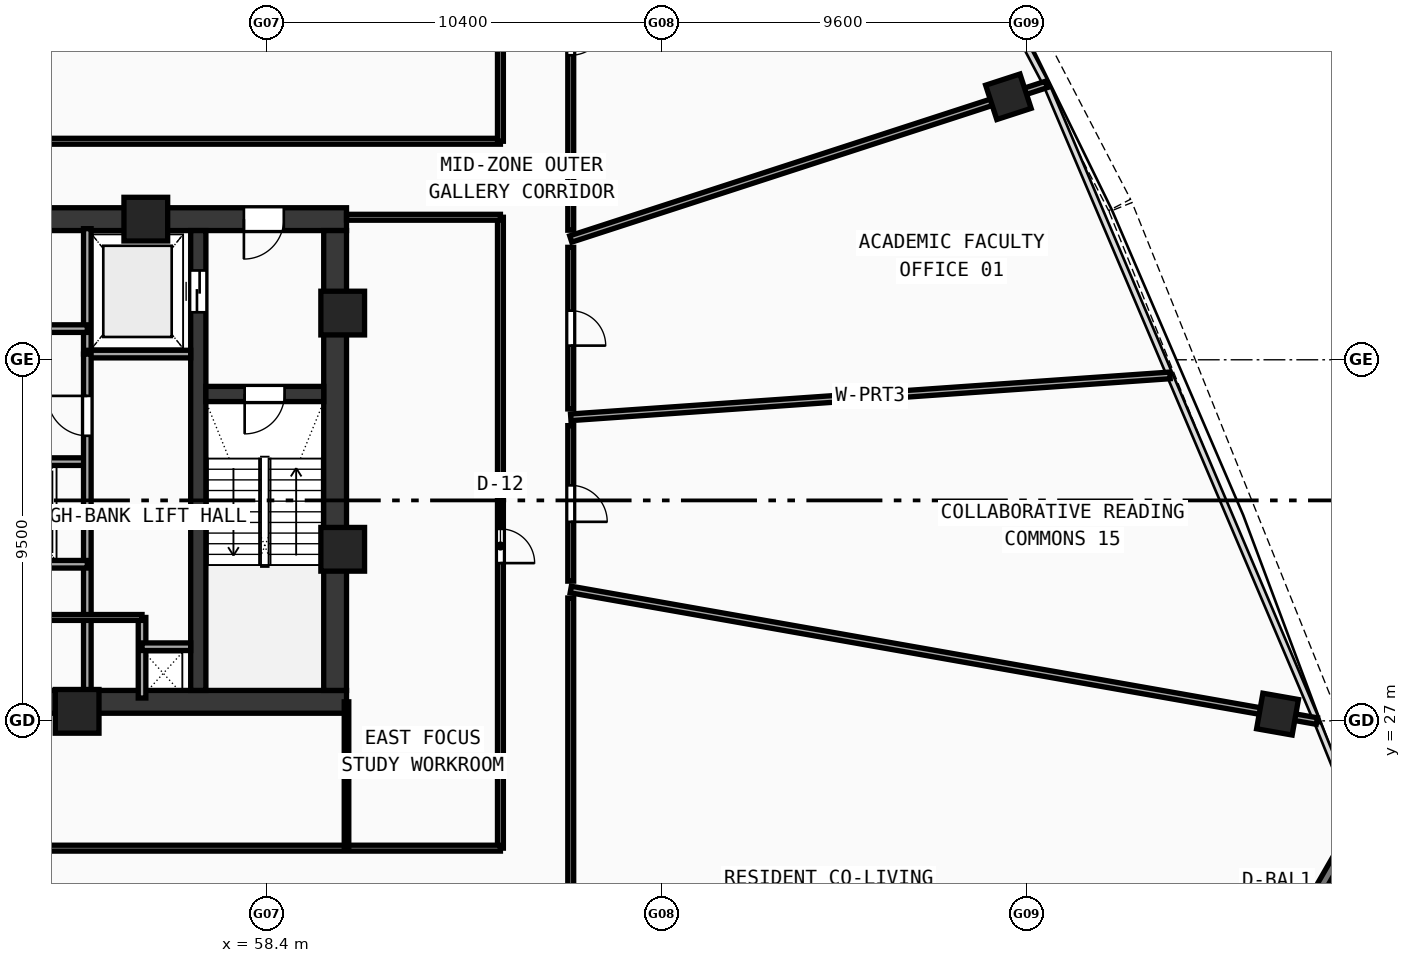
"""IFC4 building model, lengths in metres.
Left out: names, types, materials, properties, quantities, classifications, styles, units other than length and angle.
Written with IfcOpenShell. Run it as: python <this file> out.ifc"""

import sys

from ifc_helpers import new_model, si_unit, direction, frame, frame_2d, origin, origin_with_axes, origin_2d, place, context, subcontext, project, spatial, rectangle, hollow_rectangle, extrude, source, transform, mapped, element, fill, save


model = new_model("IFC4")
c1 = context("Model", 3, precision=1e-05, world=origin(), true_north=direction((0.0, 1.0)))
c2 = subcontext(c1, "Body", "Model", "MODEL_VIEW")
j1 = project(units=[si_unit("LENGTHUNIT", "METRE"), si_unit("PLANEANGLEUNIT", "RADIAN")], contexts=[c1])
p1 = place(None, origin())
s1 = spatial("IfcSite", under=j1, at=p1, CompositionType="ELEMENT")
p2 = place(p1, origin())
s2 = spatial("IfcBuilding", under=s1, at=p2, CompositionType="ELEMENT")
p3 = place(p2, frame((0.0, 0.0, 162.95)))
s3 = spatial("IfcBuildingStorey", under=s2, at=p3, CompositionType="ELEMENT", Elevation=162.95)
p4 = place(p3, frame((35.5, 27.5, 0.0), z_axis=(0.0, 0.0, 1.0), x_axis=(1.0, 0.0, 0.0)))
e1 = element("IfcWall", 1, at=p4, inside=s3, PredefinedType="SHEAR", context=c2, shape_type="SweptSolid", body=[
    extrude(rectangle(XDim=25.0, YDim=0.6, at=frame_2d((12.5, 0.0))), origin(), (0.0, 0.0, 1.0), 3.42),
])
p5 = place(p3, frame((49.2, 40.2, 0.0), z_axis=(0.0, 0.0, 1.0), x_axis=(1.0, 0.0, 0.0)))
e2 = element("IfcWall", 2, at=p5, inside=s3, PredefinedType="SHEAR", context=c2, shape_type="SweptSolid", body=[
    extrude(rectangle(XDim=11.3, YDim=0.6, at=frame_2d((5.65, 0.0))), origin(), (0.0, 0.0, 1.0), 3.42),
])
p6 = place(p5, frame((8.6, 0.0, 0.0)))
e3 = element("IfcOpeningElement", 3, at=p6, cuts=e2, PredefinedType="OPENING", context=c2, shape_type="SweptSolid", body=[
    extrude(rectangle(XDim=1.05, YDim=2.1, at=frame_2d((0.525, 1.05))), frame((0.0, 0.31, 0.0), z_axis=(0.0, -1.0, 0.0), x_axis=(1.0, 0.0, 0.0)), (0.0, 0.0, 1.0), 0.62),
])
p7 = place(p3, frame((60.2, 27.8, 0.0), z_axis=(0.0, 0.0, 1.0), x_axis=(0.0, 1.0, 0.0)))
e4 = element("IfcWall", 4, at=p7, inside=s3, PredefinedType="SHEAR", context=c2, shape_type="SweptSolid", body=[
    extrude(rectangle(XDim=12.1, YDim=0.6, at=frame_2d((6.05, 0.0))), origin(), (0.0, 0.0, 1.0), 3.42),
])
p8 = place(p3, frame((56.6, 27.8, 0.0), z_axis=(0.0, 0.0, 1.0), x_axis=(0.0, 1.0, 0.0)))
e5 = element("IfcWall", 5, at=p8, inside=s3, PredefinedType="SHEAR", context=c2, shape_type="SweptSolid", body=[
    extrude(rectangle(XDim=12.1, YDim=0.4, at=frame_2d((6.05, 0.0))), origin(), (0.0, 0.0, 1.0), 3.42),
])
p9 = place(p8, frame((9.95, 0.0, 0.0)))
e6 = element("IfcOpeningElement", 6, at=p9, cuts=e5, PredefinedType="OPENING", context=c2, shape_type="SweptSolid", body=[
    extrude(rectangle(XDim=1.1, YDim=2.1, at=frame_2d((0.55, 1.05))), frame((0.0, 0.21, 0.0), z_axis=(0.0, -1.0, 0.0), x_axis=(1.0, 0.0, 0.0)), (0.0, 0.0, 1.0), 0.42),
])
p10 = place(p3, frame((56.8, 35.6, 0.0), z_axis=(0.0, 0.0, 1.0), x_axis=(1.0, 0.0, 0.0)))
e7 = element("IfcWall", 7, at=p10, inside=s3, PredefinedType="SHEAR", context=c2, shape_type="SweptSolid", body=[
    extrude(rectangle(XDim=3.1, YDim=0.4, at=frame_2d((1.55, 0.0))), origin(), (0.0, 0.0, 1.0), 3.42),
])
p11 = place(p10, frame((1.02, 0.0, 0.0)))
e8 = element("IfcOpeningElement", 8, at=p11, cuts=e7, PredefinedType="OPENING", context=c2, shape_type="SweptSolid", body=[
    extrude(rectangle(XDim=1.05, YDim=2.1, at=frame_2d((0.525, 1.05))), frame((0.0, 0.21, 0.0), z_axis=(0.0, -1.0, 0.0), x_axis=(1.0, 0.0, 0.0)), (0.0, 0.0, 1.0), 0.42),
])
m1 = source(origin(), c2, "Body", "SweptSolid", [
    extrude(hollow_rectangle(XDim=1.15, YDim=1.15, WallThickness=0.048, at=origin_2d()), origin(), (0.0, 0.0, 1.0), 3.68),
])
for number, where, z_axis, x_axis in (
    (9, (53.412, 27.25, -0.26), (0.0, 0.0, 1.0), (1.0, 0.0, 0.0)),
    (10, (60.4, 31.513, -0.26), (0.0, 0.0, 1.0), (1.0, 0.0, 0.0)),
    (11, (60.4, 37.729, -0.26), (0.0, 0.0, 1.0), (1.0, 0.0, 0.0)),
    (12, (55.219, 40.2, -0.26), (0.0, 0.0, 1.0), (1.0, 0.0, 0.0)),
):
    element("IfcColumn", number, at=place(p3, frame(where, z_axis=z_axis, x_axis=x_axis)), inside=s3, PredefinedType="COLUMN", context=c2, shape_type="MappedRepresentation", body=[
        mapped(m1, transform((0.0, 0.0, 0.0), scale=1.0)),
    ])
m2 = source(origin(), c2, "Body", "SweptSolid", [
    extrude(hollow_rectangle(XDim=0.95, YDim=0.95, WallThickness=0.04, at=origin_2d()), origin(), (0.0, 0.0, 1.0), 3.68),
])
for number, where, z_axis, x_axis in (
    (13, (84.997, 27.177, -0.26), (0.0, 0.0, 1.0), (0.174, 0.985, 0.0)),
    (14, (77.915, 43.42, -0.26), (0.0, 0.0, 1.0), (-0.309, 0.951, 0.0)),
):
    element("IfcColumn", number, at=place(p3, frame(where, z_axis=z_axis, x_axis=x_axis)), inside=s3, PredefinedType="COLUMN", context=c2, shape_type="MappedRepresentation", body=[
        mapped(m2, transform((0.0, 0.0, 0.0), scale=1.0)),
    ])
p12 = place(p3, frame((82.814, 16.821, 0.0), z_axis=(0.0, 0.0, 1.0), x_axis=(0.497939858886, 0.867211564114, 0.0)))
e15 = element("IfcWall", 15, at=p12, inside=s3, PredefinedType="STANDARD", context=c2, shape_type="SweptSolid", body=[
    extrude(rectangle(XDim=8.696, YDim=0.26, at=frame_2d((4.348, 0.0))), origin(), (0.0, 0.0, 1.0), 3.42),
])
p13 = place(p12, frame((3.448, 0.0, 0.0)))
e16 = element("IfcOpeningElement", 16, at=p13, cuts=e15, PredefinedType="OPENING", context=c2, shape_type="SweptSolid", body=[
    extrude(rectangle(XDim=1.8, YDim=2.15, at=frame_2d((0.9, 1.075))), frame((0.0, 0.14, 0.0), z_axis=(0.0, -1.0, 0.0), x_axis=(1.0, 0.0, 0.0)), (0.0, 0.0, 1.0), 0.28),
])
p14 = place(p3, frame((53.68, 36.65, 0.0), z_axis=(0.0, 0.0, 1.0), x_axis=(0.0, 1.0, 0.0)))
e17 = element("IfcWall", 17, at=p14, inside=s3, PredefinedType="SOLIDWALL", context=c2, shape_type="SweptSolid", body=[
    extrude(rectangle(XDim=3.3, YDim=0.2, at=frame_2d((1.65, 0.0))), origin(), (0.0, 0.0, 1.0), 3.42),
])
p15 = place(p3, frame((53.68, 36.65, 0.0), z_axis=(0.0, 0.0, 1.0), x_axis=(1.0, 0.0, 0.0)))
e18 = element("IfcWall", 18, at=p15, inside=s3, PredefinedType="SOLIDWALL", context=c2, shape_type="SweptSolid", body=[
    extrude(rectangle(XDim=2.72, YDim=0.2, at=frame_2d((1.36, 0.0))), origin(), (0.0, 0.0, 1.0), 3.42),
])
p16 = place(p3, frame((48.95, 37.32, 0.0), z_axis=(0.0, 0.0, 1.0), x_axis=(1.0, 0.0, 0.0)))
e19 = element("IfcWall", 19, at=p16, inside=s3, PredefinedType="SOLIDWALL", context=c2, shape_type="SweptSolid", body=[
    extrude(rectangle(XDim=4.73, YDim=0.2, at=frame_2d((2.365, 0.0))), origin(), (0.0, 0.0, 1.0), 3.42),
])
p17 = place(p16, frame((1.8, 0.0, 0.0)))
e20 = element("IfcOpeningElement", 20, at=p17, cuts=e19, PredefinedType="OPENING", context=c2, shape_type="SweptSolid", body=[
    extrude(rectangle(XDim=0.9, YDim=2.1, at=frame_2d((0.45, 1.05))), frame((0.0, 0.11, 0.0), z_axis=(0.0, -1.0, 0.0), x_axis=(1.0, 0.0, 0.0)), (0.0, 0.0, 1.0), 0.22),
])
p18 = place(p3, frame((43.85, 33.82, 0.0), z_axis=(0.0, 0.0, 1.0), x_axis=(1.0, 0.0, 0.0)))
e21 = element("IfcWall", 21, at=p18, inside=s3, PredefinedType="SOLIDWALL", context=c2, shape_type="SweptSolid", body=[
    extrude(rectangle(XDim=9.83, YDim=0.2, at=frame_2d((4.915, 0.0))), origin(), (0.0, 0.0, 1.0), 3.42),
])
p19 = place(p18, frame((0.575, 0.0, 0.0)))
e22 = element("IfcOpeningElement", 22, at=p19, cuts=e21, PredefinedType="OPENING", context=c2, shape_type="SweptSolid", body=[
    extrude(rectangle(XDim=1.05, YDim=2.1, at=frame_2d((0.525, 1.05))), frame((0.0, 0.11, 0.0), z_axis=(0.0, -1.0, 0.0), x_axis=(1.0, 0.0, 0.0)), (0.0, 0.0, 1.0), 0.22),
])
p20 = place(p18, frame((2.875, 0.0, 0.0)))
e23 = element("IfcOpeningElement", 23, at=p20, cuts=e21, PredefinedType="OPENING", context=c2, shape_type="SweptSolid", body=[
    extrude(rectangle(XDim=1.05, YDim=2.1, at=frame_2d((0.525, 1.05))), frame((0.0, 0.11, 0.0), z_axis=(0.0, -1.0, 0.0), x_axis=(1.0, 0.0, 0.0)), (0.0, 0.0, 1.0), 0.22),
])
p21 = place(p18, frame((5.175, 0.0, 0.0)))
e24 = element("IfcOpeningElement", 24, at=p21, cuts=e21, PredefinedType="OPENING", context=c2, shape_type="SweptSolid", body=[
    extrude(rectangle(XDim=1.05, YDim=2.1, at=frame_2d((0.525, 1.05))), frame((0.0, 0.11, 0.0), z_axis=(0.0, -1.0, 0.0), x_axis=(1.0, 0.0, 0.0)), (0.0, 0.0, 1.0), 0.22),
])
p22 = place(p18, frame((7.475, 0.0, 0.0)))
e25 = element("IfcOpeningElement", 25, at=p22, cuts=e21, PredefinedType="OPENING", context=c2, shape_type="SweptSolid", body=[
    extrude(rectangle(XDim=1.05, YDim=2.1, at=frame_2d((0.525, 1.05))), frame((0.0, 0.11, 0.0), z_axis=(0.0, -1.0, 0.0), x_axis=(1.0, 0.0, 0.0)), (0.0, 0.0, 1.0), 0.22),
])
p23 = place(p3, frame((53.68, 27.6, 0.0), z_axis=(0.0, 0.0, 1.0), x_axis=(0.0, 1.0, 0.0)))
e26 = element("IfcWall", 26, at=p23, inside=s3, PredefinedType="SOLIDWALL", context=c2, shape_type="SweptSolid", body=[
    extrude(rectangle(XDim=9.05, YDim=0.2, at=frame_2d((4.525, 0.0))), origin(), (0.0, 0.0, 1.0), 3.42),
])
p24 = place(p23, frame((6.9, 0.0, 0.0)))
e27 = element("IfcOpeningElement", 27, at=p24, cuts=e26, PredefinedType="OPENING", context=c2, shape_type="SweptSolid", body=[
    extrude(rectangle(XDim=1.05, YDim=2.1, at=frame_2d((0.525, 1.05))), frame((0.0, 0.11, 0.0), z_axis=(0.0, -1.0, 0.0), x_axis=(1.0, 0.0, 0.0)), (0.0, 0.0, 1.0), 0.22),
])
p25 = place(p3, frame((43.85, 31.12, 0.0), z_axis=(0.0, 0.0, 1.0), x_axis=(1.0, 0.0, 0.0)))
e28 = element("IfcWall", 28, at=p25, inside=s3, PredefinedType="SOLIDWALL", context=c2, shape_type="SweptSolid", body=[
    extrude(rectangle(XDim=9.83, YDim=0.2, at=frame_2d((4.915, 0.0))), origin(), (0.0, 0.0, 1.0), 3.42),
])
p26 = place(p3, frame((55.12, 27.6, 0.0), z_axis=(0.0, 0.0, 1.0), x_axis=(0.0, 1.0, 0.0)))
e29 = element("IfcWall", 29, at=p26, inside=s3, PredefinedType="SOLIDWALL", context=c2, shape_type="SweptSolid", body=[
    extrude(rectangle(XDim=2.12, YDim=0.2, at=frame_2d((1.06, 0.0))), origin(), (0.0, 0.0, 1.0), 3.42),
])
p27 = place(p3, frame((55.12, 28.95, 0.0), z_axis=(0.0, 0.0, 1.0), x_axis=(1.0, 0.0, 0.0)))
e30 = element("IfcWall", 30, at=p27, inside=s3, PredefinedType="SOLIDWALL", context=c2, shape_type="SweptSolid", body=[
    extrude(rectangle(XDim=1.28, YDim=0.2, at=frame_2d((0.64, 0.0))), origin(), (0.0, 0.0, 1.0), 3.42),
])
p28 = place(p3, frame((51.05, 29.72, 0.0), z_axis=(0.0, 0.0, 1.0), x_axis=(1.0, 0.0, 0.0)))
e31 = element("IfcWall", 31, at=p28, inside=s3, PredefinedType="PARTITIONING", context=c2, shape_type="SweptSolid", body=[
    extrude(rectangle(XDim=4.07, YDim=0.155, at=frame_2d((2.035, 0.0))), origin(), (0.0, 0.0, 1.0), 3.42),
])
p29 = place(p28, frame((0.5, 0.0, 0.0)))
e32 = element("IfcOpeningElement", 32, at=p29, cuts=e31, PredefinedType="OPENING", context=c2, shape_type="SweptSolid", body=[
    extrude(rectangle(XDim=0.9, YDim=2.1, at=frame_2d((0.45, 1.05))), frame((0.0, 0.087, 0.0), z_axis=(0.0, -1.0, 0.0), x_axis=(1.0, 0.0, 0.0)), (0.0, 0.0, 1.0), 0.175),
])
p30 = place(p3, frame((31.45, 42.25, 0.0), z_axis=(0.0, 0.0, 1.0), x_axis=(1.0, 0.0, 0.0)))
e33 = element("IfcWall", 33, at=p30, inside=s3, PredefinedType="PARTITIONING", context=c2, shape_type="SweptSolid", body=[
    extrude(rectangle(XDim=33.1, YDim=0.155, at=frame_2d((16.55, 0.0))), origin(), (0.0, 0.0, 1.0), 2.77),
])
p31 = place(p3, frame((64.55, 42.25, 0.0), z_axis=(0.0, 0.0, 1.0), x_axis=(0.0, 1.0, 0.0)))
e34 = element("IfcWall", 34, at=p31, inside=s3, PredefinedType="PARTITIONING", context=c2, shape_type="SweptSolid", body=[
    extrude(rectangle(XDim=11.7, YDim=0.155, at=frame_2d((5.85, 0.0))), origin(), (0.0, 0.0, 1.0), 2.77),
])
p32 = place(p3, frame((64.55, 23.65, 0.0), z_axis=(0.0, 0.0, 1.0), x_axis=(0.0, 1.0, 0.0)))
e35 = element("IfcWall", 35, at=p32, inside=s3, PredefinedType="PARTITIONING", context=c2, shape_type="SweptSolid", body=[
    extrude(rectangle(XDim=16.6, YDim=0.155, at=frame_2d((8.3, 0.0))), origin(), (0.0, 0.0, 1.0), 2.77),
])
p33 = place(p32, frame((7.5, 0.0, 0.0)))
e36 = element("IfcOpeningElement", 36, at=p33, cuts=e35, PredefinedType="OPENING", context=c2, shape_type="SweptSolid", body=[
    extrude(rectangle(XDim=0.9, YDim=2.08, at=frame_2d((0.45, 1.04))), frame((0.0, 0.087, 0.0), z_axis=(0.0, -1.0, 0.0), x_axis=(1.0, 0.0, 0.0)), (0.0, 0.0, 1.0), 0.175),
])
p34 = place(p3, frame((31.45, 23.65, 0.0), z_axis=(0.0, 0.0, 1.0), x_axis=(1.0, 0.0, 0.0)))
e37 = element("IfcWall", 37, at=p34, inside=s3, PredefinedType="PARTITIONING", context=c2, shape_type="SweptSolid", body=[
    extrude(rectangle(XDim=33.1, YDim=0.155, at=frame_2d((16.55, 0.0))), origin(), (0.0, 0.0, 1.0), 2.77),
])
p35 = place(p34, frame((16.0, 0.0, 0.0)))
e38 = element("IfcOpeningElement", 38, at=p35, cuts=e37, PredefinedType="OPENING", context=c2, shape_type="SweptSolid", body=[
    extrude(rectangle(XDim=0.92, YDim=2.1, at=frame_2d((0.46, 1.05))), frame((0.0, 0.087, 0.0), z_axis=(0.0, -1.0, 0.0), x_axis=(1.0, 0.0, 0.0)), (0.0, 0.0, 1.0), 0.175),
])
p36 = place(p3, frame((60.5, 40.25, 0.0), z_axis=(0.0, 0.0, 1.0), x_axis=(1.0, 0.0, 0.0)))
e39 = element("IfcWall", 39, at=p36, inside=s3, PredefinedType="PARTITIONING", context=c2, shape_type="SweptSolid", body=[
    extrude(rectangle(XDim=4.05, YDim=0.155, at=frame_2d((2.025, 0.0))), origin(), (0.0, 0.0, 1.0), 3.42),
])
p37 = place(p3, frame((60.5, 23.65, 0.0), z_axis=(0.0, 0.0, 1.0), x_axis=(0.0, 1.0, 0.0)))
e40 = element("IfcWall", 40, at=p37, inside=s3, PredefinedType="PARTITIONING", context=c2, shape_type="SweptSolid", body=[
    extrude(rectangle(XDim=3.85, YDim=0.12, at=frame_2d((1.925, 0.0))), origin(), (0.0, 0.0, 1.0), 3.02),
])
p38 = place(p3, frame((66.4, 34.987, 0.0), z_axis=(0.0, 0.0, 1.0), x_axis=(0.997565064246, 0.069741971556, 0.0)))
e41 = element("IfcWall", 41, at=p38, inside=s3, PredefinedType="PARTITIONING", context=c2, shape_type="SweptSolid", body=[
    extrude(rectangle(XDim=15.805, YDim=0.175, at=frame_2d((7.903, 0.0))), origin(), (0.0, 0.0, 1.0), 2.77),
])
p39 = place(p3, frame((66.4, 39.678, 0.0), z_axis=(0.0, 0.0, 1.0), x_axis=(0.951058745875, 0.309010132349, 0.0)))
e42 = element("IfcWall", 42, at=p39, inside=s3, PredefinedType="PARTITIONING", context=c2, shape_type="SweptSolid", body=[
    extrude(rectangle(XDim=13.158, YDim=0.175, at=frame_2d((6.579, 0.0))), origin(), (0.0, 0.0, 1.0), 2.77),
])
p40 = place(p3, frame((66.4, 30.456, 0.0), z_axis=(0.0, 0.0, 1.0), x_axis=(0.984808700761, -0.173642802629, 0.0)))
e43 = element("IfcWall", 43, at=p40, inside=s3, PredefinedType="PARTITIONING", context=c2, shape_type="SweptSolid", body=[
    extrude(rectangle(XDim=19.934, YDim=0.175, at=frame_2d((9.967, 0.0))), origin(), (0.0, 0.0, 1.0), 2.77),
])
p41 = place(p3, frame((66.4, 50.048, 0.0), z_axis=(0.0, 0.0, 1.0), x_axis=(0.0, -1.0, 0.0)))
e44 = element("IfcWall", 44, at=p41, inside=s3, PredefinedType="PARTITIONING", context=c2, shape_type="SweptSolid", body=[
    extrude(rectangle(XDim=10.138, YDim=0.155, at=frame_2d((5.069, 0.0))), origin(), (0.0, 0.0, 1.0), 2.77),
])
p42 = place(p41, frame((4.615, 0.0, 0.0)))
e45 = element("IfcOpeningElement", 45, at=p42, cuts=e44, PredefinedType="OPENING", context=c2, shape_type="SweptSolid", body=[
    extrude(rectangle(XDim=0.92, YDim=2.1, at=frame_2d((0.46, 1.05))), frame((0.0, 0.087, 0.0), z_axis=(0.0, -1.0, 0.0), x_axis=(1.0, 0.0, 0.0)), (0.0, 0.0, 1.0), 0.175),
])
p43 = place(p3, frame((66.4, 39.459, 0.0), z_axis=(0.0, 0.0, 1.0), x_axis=(0.0, -1.0, 0.0)))
e46 = element("IfcWall", 46, at=p43, inside=s3, PredefinedType="PARTITIONING", context=c2, shape_type="SweptSolid", body=[
    extrude(rectangle(XDim=4.251, YDim=0.155, at=frame_2d((2.126, 0.0))), origin(), (0.0, 0.0, 1.0), 3.42),
])
p44 = place(p43, frame((1.666, 0.0, 0.0)))
e47 = element("IfcOpeningElement", 47, at=p44, cuts=e46, PredefinedType="OPENING", context=c2, shape_type="SweptSolid", body=[
    extrude(rectangle(XDim=0.92, YDim=2.1, at=frame_2d((0.46, 1.05))), frame((0.0, 0.087, 0.0), z_axis=(0.0, -1.0, 0.0), x_axis=(1.0, 0.0, 0.0)), (0.0, 0.0, 1.0), 0.175),
])
p45 = place(p3, frame((66.4, 34.767, 0.0), z_axis=(0.0, 0.0, 1.0), x_axis=(0.0, -1.0, 0.0)))
e48 = element("IfcWall", 48, at=p45, inside=s3, PredefinedType="PARTITIONING", context=c2, shape_type="SweptSolid", body=[
    extrude(rectangle(XDim=4.092, YDim=0.155, at=frame_2d((2.046, 0.0))), origin(), (0.0, 0.0, 1.0), 3.42),
])
p46 = place(p45, frame((1.571, 0.0, 0.0)))
e49 = element("IfcOpeningElement", 49, at=p46, cuts=e48, PredefinedType="OPENING", context=c2, shape_type="SweptSolid", body=[
    extrude(rectangle(XDim=0.96, YDim=2.12, at=frame_2d((0.48, 1.06))), frame((0.0, 0.087, 0.0), z_axis=(0.0, -1.0, 0.0), x_axis=(1.0, 0.0, 0.0)), (0.0, 0.0, 1.0), 0.175),
])
p47 = place(p3, frame((66.4, 30.232, 0.0), z_axis=(0.0, 0.0, 1.0), x_axis=(0.0, -1.0, 0.0)))
e50 = element("IfcWall", 50, at=p47, inside=s3, PredefinedType="PARTITIONING", context=c2, shape_type="SweptSolid", body=[
    extrude(rectangle(XDim=8.432, YDim=0.155, at=frame_2d((4.216, 0.0))), origin(), (0.0, 0.0, 1.0), 3.02),
])
m3 = source(origin(), c2, "Body", "SweptSolid", [
    extrude(rectangle(XDim=1.05, YDim=2.1, at=frame_2d((0.525, 1.05))), frame((0.0, 0.025, 0.0), z_axis=(0.0, -1.0, 0.0), x_axis=(1.0, 0.0, 0.0)), (0.0, 0.0, 1.0), 0.05),
])
p48 = place(p11, frame((1.05, 0.0, 0.0), z_axis=(0.0, 0.0, 1.0), x_axis=(-1.0, 0.0, 0.0)))
e51 = element("IfcDoor", 51, at=p48, inside=s3, OperationType="SINGLE_SWING_RIGHT", PredefinedType="DOOR", context=c2, shape_type="MappedRepresentation", body=[
    mapped(m3, transform((0.0, 0.0, 0.0), scale=1.0)),
])
fill(e8, e51)
p49 = place(p6, frame((1.05, 0.0, 0.0), z_axis=(0.0, 0.0, 1.0), x_axis=(-1.0, 0.0, 0.0)))
e52 = element("IfcDoor", 52, at=p49, inside=s3, OperationType="SINGLE_SWING_RIGHT", PredefinedType="DOOR", context=c2, shape_type="MappedRepresentation", body=[
    mapped(m3, transform((0.0, 0.0, 0.0), scale=1.0)),
])
fill(e3, e52)
m4 = source(origin(), c2, "Body", "SweptSolid", [
    extrude(rectangle(XDim=1.1, YDim=2.1, at=frame_2d((0.55, 1.05))), frame((0.0, 0.025, 0.0), z_axis=(0.0, -1.0, 0.0), x_axis=(1.0, 0.0, 0.0)), (0.0, 0.0, 1.0), 0.05),
])
p50 = place(p9, origin_with_axes())
e53 = element("IfcDoor", 53, at=p50, inside=s3, OperationType="DOUBLE_DOOR_SLIDING", PredefinedType="DOOR", context=c2, shape_type="MappedRepresentation", body=[
    mapped(m4, transform((0.0, 0.0, 0.0), scale=1.0)),
])
fill(e6, e53)
p51 = place(p24, origin_with_axes())
e54 = element("IfcDoor", 54, at=p51, inside=s3, OperationType="SINGLE_SWING_RIGHT", PredefinedType="DOOR", context=c2, shape_type="MappedRepresentation", body=[
    mapped(m3, transform((0.0, 0.0, 0.0), scale=1.0)),
])
fill(e27, e54)
m5 = source(origin(), c2, "Body", "SweptSolid", [
    extrude(rectangle(XDim=0.9, YDim=2.08, at=frame_2d((0.45, 1.04))), frame((0.0, 0.025, 0.0), z_axis=(0.0, -1.0, 0.0), x_axis=(1.0, 0.0, 0.0)), (0.0, 0.0, 1.0), 0.05),
])
p52 = place(p33, frame((0.9, 0.0, 0.0), z_axis=(0.0, 0.0, 1.0), x_axis=(-1.0, 0.0, 0.0)))
e55 = element("IfcDoor", 55, at=p52, inside=s3, OperationType="SINGLE_SWING_RIGHT", PredefinedType="DOOR", context=c2, shape_type="MappedRepresentation", body=[
    mapped(m5, transform((0.0, 0.0, 0.0), scale=1.0)),
])
fill(e36, e55)
m6 = source(origin(), c2, "Body", "SweptSolid", [
    extrude(rectangle(XDim=0.92, YDim=2.1, at=frame_2d((0.46, 1.05))), frame((0.0, 0.025, 0.0), z_axis=(0.0, -1.0, 0.0), x_axis=(1.0, 0.0, 0.0)), (0.0, 0.0, 1.0), 0.05),
])
p53 = place(p44, origin_with_axes())
e56 = element("IfcDoor", 56, at=p53, inside=s3, OperationType="SINGLE_SWING_RIGHT", PredefinedType="DOOR", context=c2, shape_type="MappedRepresentation", body=[
    mapped(m6, transform((0.0, 0.0, 0.0), scale=1.0)),
])
fill(e47, e56)
p54 = place(p42, origin_with_axes())
e57 = element("IfcDoor", 57, at=p54, inside=s3, OperationType="SINGLE_SWING_LEFT", PredefinedType="DOOR", context=c2, shape_type="MappedRepresentation", body=[
    mapped(m6, transform((0.0, 0.0, 0.0), scale=1.0)),
])
fill(e45, e57)
m7 = source(origin(), c2, "Body", "SweptSolid", [
    extrude(rectangle(XDim=0.96, YDim=2.12, at=frame_2d((0.48, 1.06))), frame((0.0, 0.025, 0.0), z_axis=(0.0, -1.0, 0.0), x_axis=(1.0, 0.0, 0.0)), (0.0, 0.0, 1.0), 0.05),
])
p55 = place(p46, origin_with_axes())
e58 = element("IfcDoor", 58, at=p55, inside=s3, OperationType="SINGLE_SWING_RIGHT", PredefinedType="DOOR", context=c2, shape_type="MappedRepresentation", body=[
    mapped(m7, transform((0.0, 0.0, 0.0), scale=1.0)),
])
fill(e49, e58)
save(model, sys.argv[1])
